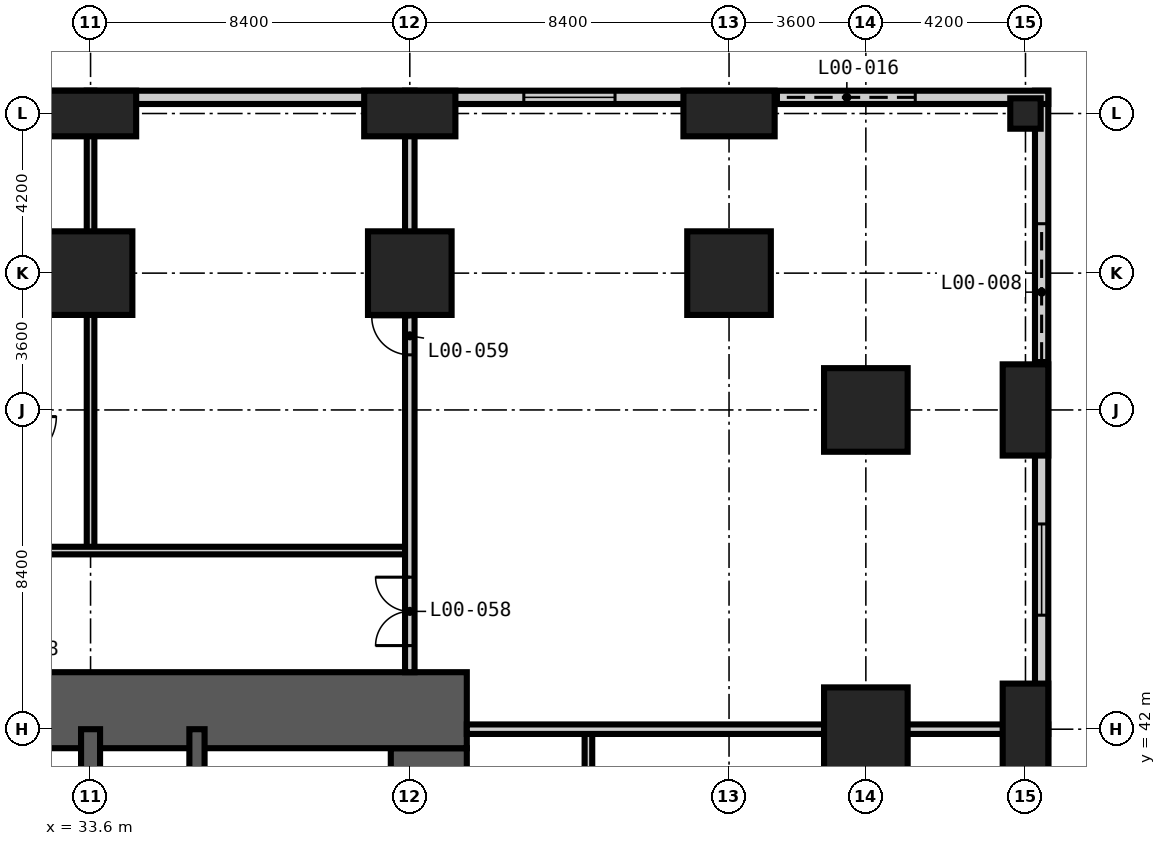
"""IFC4 building model, lengths in metres.
Left out: names, types, materials, properties, quantities, classifications, styles, units other than length and angle.
Written with IfcOpenShell. Run it as: python <this file> out.ifc"""

import sys

from ifc_helpers import new_model, si_unit, direction, frame, frame_2d, origin, origin_2d, place, context, subcontext, project, spatial, rectangle, extrude, element, fill, save


model = new_model("IFC4")
c1 = context("Model", 3, precision=1e-05, world=origin(), true_north=direction((0.0, 1.0)))
c2 = subcontext(c1, "Body", "Model", "MODEL_VIEW")
j1 = project(units=[si_unit("LENGTHUNIT", "METRE"), si_unit("PLANEANGLEUNIT", "RADIAN")], contexts=[c1])
p1 = place(None, origin())
s1 = spatial("IfcSite", under=j1, at=p1, CompositionType="ELEMENT")
p2 = place(p1, origin())
s2 = spatial("IfcBuilding", under=s1, at=p2, CompositionType="ELEMENT")
p3 = place(p2, origin())
s3 = spatial("IfcBuildingStorey", under=s2, at=p3, CompositionType="ELEMENT", Elevation=0.0)
p4 = place(p3, frame((33.6, 54.0, -0.3), z_axis=(0.0, 0.0, 1.0), x_axis=(1.0, 0.0, 0.0)))
e1 = element("IfcColumn", 1, at=p4, inside=s3, PredefinedType="COLUMN", context=c2, shape_type="SweptSolid", body=[
    extrude(rectangle(XDim=2.2, YDim=2.2, at=origin_2d()), origin(), (0.0, 0.0, 1.0), 6.0),
])
p5 = place(p3, frame((33.6, 58.2, -0.3), z_axis=(0.0, 0.0, 1.0), x_axis=(1.0, 0.0, 0.0)))
e2 = element("IfcColumn", 2, at=p5, inside=s3, PredefinedType="COLUMN", context=c2, shape_type="SweptSolid", body=[
    extrude(rectangle(XDim=2.4, YDim=1.2, at=origin_2d()), origin(), (0.0, 0.0, 1.0), 6.0),
])
p6 = place(p3, frame((42.0, 54.0, -0.3), z_axis=(0.0, 0.0, 1.0), x_axis=(1.0, 0.0, 0.0)))
e3 = element("IfcColumn", 3, at=p6, inside=s3, PredefinedType="COLUMN", context=c2, shape_type="SweptSolid", body=[
    extrude(rectangle(XDim=2.2, YDim=2.2, at=origin_2d()), origin(), (0.0, 0.0, 1.0), 6.0),
])
p7 = place(p3, frame((42.0, 58.2, -0.3), z_axis=(0.0, 0.0, 1.0), x_axis=(1.0, 0.0, 0.0)))
e4 = element("IfcColumn", 4, at=p7, inside=s3, PredefinedType="COLUMN", context=c2, shape_type="SweptSolid", body=[
    extrude(rectangle(XDim=2.4, YDim=1.2, at=origin_2d()), origin(), (0.0, 0.0, 1.0), 6.0),
])
p8 = place(p3, frame((50.4, 54.0, -0.3), z_axis=(0.0, 0.0, 1.0), x_axis=(1.0, 0.0, 0.0)))
e5 = element("IfcColumn", 5, at=p8, inside=s3, PredefinedType="COLUMN", context=c2, shape_type="SweptSolid", body=[
    extrude(rectangle(XDim=2.2, YDim=2.2, at=origin_2d()), origin(), (0.0, 0.0, 1.0), 6.0),
])
p9 = place(p3, frame((50.4, 58.2, -0.3), z_axis=(0.0, 0.0, 1.0), x_axis=(1.0, 0.0, 0.0)))
e6 = element("IfcColumn", 6, at=p9, inside=s3, PredefinedType="COLUMN", context=c2, shape_type="SweptSolid", body=[
    extrude(rectangle(XDim=2.4, YDim=1.2, at=origin_2d()), origin(), (0.0, 0.0, 1.0), 6.0),
])
for number, where, z_axis, x_axis in (
    (7, (54.0, 42.0, -0.3), (0.0, 0.0, 1.0), (1.0, 0.0, 0.0)),
    (8, (54.0, 50.4, -0.3), (0.0, 0.0, 1.0), (1.0, 0.0, 0.0)),
):
    element("IfcColumn", number, at=place(p3, frame(where, z_axis=z_axis, x_axis=x_axis)), inside=s3, PredefinedType="COLUMN", context=c2, shape_type="SweptSolid", body=[
        extrude(rectangle(XDim=2.2, YDim=2.2, at=origin_2d()), origin(), (0.0, 0.0, 1.0), 6.0),
    ])
for number, where, z_axis, x_axis in (
    (9, (58.2, 42.0, -0.3), (0.0, 0.0, 1.0), (1.0, 0.0, 0.0)),
    (10, (58.2, 50.4, -0.3), (0.0, 0.0, 1.0), (1.0, 0.0, 0.0)),
):
    element("IfcColumn", number, at=place(p3, frame(where, z_axis=z_axis, x_axis=x_axis)), inside=s3, PredefinedType="COLUMN", context=c2, shape_type="SweptSolid", body=[
        extrude(rectangle(XDim=1.2, YDim=2.4, at=origin_2d()), origin(), (0.0, 0.0, 1.0), 6.0),
    ])
p10 = place(p3, frame((58.2, 58.2, -0.3), z_axis=(0.0, 0.0, 1.0), x_axis=(1.0, 0.0, 0.0)))
e11 = element("IfcColumn", 11, at=p10, inside=s3, PredefinedType="COLUMN", context=c2, shape_type="SweptSolid", body=[
    extrude(rectangle(XDim=0.8, YDim=0.8, at=origin_2d()), origin(), (0.0, 0.0, 1.0), 6.0),
])
p11 = place(p3, frame((42.5, 17.3, -0.3), z_axis=(0.0, 0.0, 1.0), x_axis=(0.0, 1.0, 0.0)))
e12 = element("IfcWall", 12, at=p11, inside=s3, PredefinedType="SHEAR", context=c2, shape_type="SweptSolid", body=[
    extrude(rectangle(XDim=24.2, YDim=2.0, at=frame_2d((12.1, 0.0))), origin(), (0.0, 0.0, 1.0), 6.0),
])
p12 = place(p11, frame((0.3, 0.0, 0.3)))
e13 = element("IfcOpeningElement", 13, at=p12, cuts=e12, PredefinedType="OPENING", context=c2, shape_type="SweptSolid", body=[
    extrude(rectangle(XDim=1.2, YDim=2.2, at=frame_2d((0.6, 1.1))), frame((0.0, 1.01, 0.0), z_axis=(0.0, -1.0, 0.0), x_axis=(1.0, 0.0, 0.0)), (0.0, 0.0, 1.0), 2.02),
])
p13 = place(p11, frame((11.2, 0.0, 0.3)))
e14 = element("IfcOpeningElement", 14, at=p13, cuts=e12, PredefinedType="OPENING", context=c2, shape_type="SweptSolid", body=[
    extrude(rectangle(XDim=1.8, YDim=2.2, at=frame_2d((0.9, 1.1))), frame((0.0, 1.01, 0.0), z_axis=(0.0, -1.0, 0.0), x_axis=(1.0, 0.0, 0.0)), (0.0, 0.0, 1.0), 2.02),
])
p14 = place(p11, frame((20.0, 0.0, 0.3)))
e15 = element("IfcOpeningElement", 15, at=p14, cuts=e12, PredefinedType="OPENING", context=c2, shape_type="SweptSolid", body=[
    extrude(rectangle(XDim=1.0, YDim=2.1, at=frame_2d((0.5, 1.05))), frame((0.0, 1.01, 0.0), z_axis=(0.0, -1.0, 0.0), x_axis=(1.0, 0.0, 0.0)), (0.0, 0.0, 1.0), 2.02),
])
p15 = place(p3, frame((43.5, 42.5, -0.3), z_axis=(0.0, 0.0, 1.0), x_axis=(-1.0, 0.0, 0.0)))
e16 = element("IfcWall", 16, at=p15, inside=s3, PredefinedType="SHEAR", context=c2, shape_type="SweptSolid", body=[
    extrude(rectangle(XDim=28.2, YDim=2.0, at=frame_2d((14.1, 0.0))), origin(), (0.0, 0.0, 1.0), 6.0),
])
p16 = place(p15, frame((22.0, 0.0, 0.3)))
e17 = element("IfcOpeningElement", 17, at=p16, cuts=e16, PredefinedType="OPENING", context=c2, shape_type="SweptSolid", body=[
    extrude(rectangle(XDim=1.0, YDim=2.1, at=frame_2d((0.5, 1.05))), frame((0.0, 1.01, 0.0), z_axis=(0.0, -1.0, 0.0), x_axis=(1.0, 0.0, 0.0)), (0.0, 0.0, 1.0), 2.02),
])
p17 = place(p15, frame((11.4, 0.0, 0.3)))
e18 = element("IfcOpeningElement", 18, at=p17, cuts=e16, PredefinedType="OPENING", context=c2, shape_type="SweptSolid", body=[
    extrude(rectangle(XDim=1.2, YDim=2.2, at=frame_2d((0.6, 1.1))), frame((0.0, 1.01, 0.0), z_axis=(0.0, -1.0, 0.0), x_axis=(1.0, 0.0, 0.0)), (0.0, 0.0, 1.0), 2.02),
])
p18 = place(p3, frame((58.625, -8.4, 0.0), z_axis=(0.0, 0.0, 1.0), x_axis=(0.0, 1.0, 0.0)))
e19 = element("IfcWall", 19, at=p18, inside=s3, PredefinedType="SOLIDWALL", context=c2, shape_type="SweptSolid", body=[
    extrude(rectangle(XDim=67.2, YDim=0.35, at=frame_2d((33.6, 0.0))), origin(), (0.0, 0.0, 1.0), 5.7),
])
p19 = place(p18, frame((3.0, 0.0, 0.9)))
e20 = element("IfcOpeningElement", 20, at=p19, cuts=e19, PredefinedType="OPENING", context=c2, shape_type="SweptSolid", body=[
    extrude(rectangle(XDim=2.4, YDim=2.4, at=frame_2d((1.2, 1.2))), frame((0.0, 0.185, 0.0), z_axis=(0.0, -1.0, 0.0), x_axis=(1.0, 0.0, 0.0)), (0.0, 0.0, 1.0), 0.37),
])
p20 = place(p18, frame((18.1, 0.0, 0.0)))
e21 = element("IfcOpeningElement", 21, at=p20, cuts=e19, PredefinedType="OPENING", context=c2, shape_type="SweptSolid", body=[
    extrude(rectangle(XDim=2.4, YDim=3.0, at=frame_2d((1.2, 1.5))), frame((0.0, 0.185, 0.0), z_axis=(0.0, -1.0, 0.0), x_axis=(1.0, 0.0, 0.0)), (0.0, 0.0, 1.0), 0.37),
])
p21 = place(p18, frame((11.4, 0.0, 0.9)))
e22 = element("IfcOpeningElement", 22, at=p21, cuts=e19, PredefinedType="OPENING", context=c2, shape_type="SweptSolid", body=[
    extrude(rectangle(XDim=2.4, YDim=2.4, at=frame_2d((1.2, 1.2))), frame((0.0, 0.185, 0.0), z_axis=(0.0, -1.0, 0.0), x_axis=(1.0, 0.0, 0.0)), (0.0, 0.0, 1.0), 0.37),
])
p22 = place(p18, frame((20.7, 0.0, 0.9)))
e23 = element("IfcOpeningElement", 23, at=p22, cuts=e19, PredefinedType="OPENING", context=c2, shape_type="SweptSolid", body=[
    extrude(rectangle(XDim=2.4, YDim=2.4, at=frame_2d((1.2, 1.2))), frame((0.0, 0.185, 0.0), z_axis=(0.0, -1.0, 0.0), x_axis=(1.0, 0.0, 0.0)), (0.0, 0.0, 1.0), 0.37),
])
p23 = place(p18, frame((28.2, 0.0, 0.9)))
e24 = element("IfcOpeningElement", 24, at=p23, cuts=e19, PredefinedType="OPENING", context=c2, shape_type="SweptSolid", body=[
    extrude(rectangle(XDim=2.4, YDim=2.4, at=frame_2d((1.2, 1.2))), frame((0.0, 0.185, 0.0), z_axis=(0.0, -1.0, 0.0), x_axis=(1.0, 0.0, 0.0)), (0.0, 0.0, 1.0), 0.37),
])
p24 = place(p18, frame((36.6, 0.0, 0.9)))
e25 = element("IfcOpeningElement", 25, at=p24, cuts=e19, PredefinedType="OPENING", context=c2, shape_type="SweptSolid", body=[
    extrude(rectangle(XDim=2.4, YDim=2.4, at=frame_2d((1.2, 1.2))), frame((0.0, 0.185, 0.0), z_axis=(0.0, -1.0, 0.0), x_axis=(1.0, 0.0, 0.0)), (0.0, 0.0, 1.0), 0.37),
])
p25 = place(p18, frame((45.0, 0.0, 0.9)))
e26 = element("IfcOpeningElement", 26, at=p25, cuts=e19, PredefinedType="OPENING", context=c2, shape_type="SweptSolid", body=[
    extrude(rectangle(XDim=2.4, YDim=2.4, at=frame_2d((1.2, 1.2))), frame((0.0, 0.185, 0.0), z_axis=(0.0, -1.0, 0.0), x_axis=(1.0, 0.0, 0.0)), (0.0, 0.0, 1.0), 0.37),
])
p26 = place(p18, frame((60.1, 0.0, 0.0)))
e27 = element("IfcOpeningElement", 27, at=p26, cuts=e19, PredefinedType="OPENING", context=c2, shape_type="SweptSolid", body=[
    extrude(rectangle(XDim=3.6, YDim=4.5, at=frame_2d((1.8, 2.25))), frame((0.0, 0.185, 0.0), z_axis=(0.0, -1.0, 0.0), x_axis=(1.0, 0.0, 0.0)), (0.0, 0.0, 1.0), 0.37),
])
p27 = place(p18, frame((53.4, 0.0, 0.9)))
e28 = element("IfcOpeningElement", 28, at=p27, cuts=e19, PredefinedType="OPENING", context=c2, shape_type="SweptSolid", body=[
    extrude(rectangle(XDim=2.4, YDim=2.4, at=frame_2d((1.2, 1.2))), frame((0.0, 0.185, 0.0), z_axis=(0.0, -1.0, 0.0), x_axis=(1.0, 0.0, 0.0)), (0.0, 0.0, 1.0), 0.37),
])
p28 = place(p3, frame((58.8, 58.625, 0.0), z_axis=(0.0, 0.0, 1.0), x_axis=(-1.0, 0.0, 0.0)))
e29 = element("IfcWall", 29, at=p28, inside=s3, PredefinedType="SOLIDWALL", context=c2, shape_type="SweptSolid", body=[
    extrude(rectangle(XDim=92.4, YDim=0.35, at=frame_2d((46.2, 0.0))), origin(), (0.0, 0.0, 1.0), 5.7),
])
p29 = place(p28, frame((85.2, 0.0, 0.0)))
e30 = element("IfcOpeningElement", 30, at=p29, cuts=e29, PredefinedType="OPENING", context=c2, shape_type="SweptSolid", body=[
    extrude(rectangle(XDim=1.8, YDim=2.7, at=frame_2d((0.9, 1.35))), frame((0.0, 0.185, 0.0), z_axis=(0.0, -1.0, 0.0), x_axis=(1.0, 0.0, 0.0)), (0.0, 0.0, 1.0), 0.37),
])
p30 = place(p28, frame((87.2, 0.0, 0.9)))
e31 = element("IfcOpeningElement", 31, at=p30, cuts=e29, PredefinedType="OPENING", context=c2, shape_type="SweptSolid", body=[
    extrude(rectangle(XDim=2.4, YDim=2.4, at=frame_2d((1.2, 1.2))), frame((0.0, 0.185, 0.0), z_axis=(0.0, -1.0, 0.0), x_axis=(1.0, 0.0, 0.0)), (0.0, 0.0, 1.0), 0.37),
])
p31 = place(p28, frame((80.7, 0.0, 0.9)))
e32 = element("IfcOpeningElement", 32, at=p31, cuts=e29, PredefinedType="OPENING", context=c2, shape_type="SweptSolid", body=[
    extrude(rectangle(XDim=2.4, YDim=2.4, at=frame_2d((1.2, 1.2))), frame((0.0, 0.185, 0.0), z_axis=(0.0, -1.0, 0.0), x_axis=(1.0, 0.0, 0.0)), (0.0, 0.0, 1.0), 0.37),
])
p32 = place(p28, frame((76.2, 0.0, 0.9)))
e33 = element("IfcOpeningElement", 33, at=p32, cuts=e29, PredefinedType="OPENING", context=c2, shape_type="SweptSolid", body=[
    extrude(rectangle(XDim=2.4, YDim=2.4, at=frame_2d((1.2, 1.2))), frame((0.0, 0.185, 0.0), z_axis=(0.0, -1.0, 0.0), x_axis=(1.0, 0.0, 0.0)), (0.0, 0.0, 1.0), 0.37),
])
p33 = place(p28, frame((71.9, 0.0, 0.0)))
e34 = element("IfcOpeningElement", 34, at=p33, cuts=e29, PredefinedType="OPENING", context=c2, shape_type="SweptSolid", body=[
    extrude(rectangle(XDim=1.2, YDim=2.4, at=frame_2d((0.6, 1.2))), frame((0.0, 0.185, 0.0), z_axis=(0.0, -1.0, 0.0), x_axis=(1.0, 0.0, 0.0)), (0.0, 0.0, 1.0), 0.37),
])
p34 = place(p28, frame((63.5, 0.0, 0.0)))
e35 = element("IfcOpeningElement", 35, at=p34, cuts=e29, PredefinedType="OPENING", context=c2, shape_type="SweptSolid", body=[
    extrude(rectangle(XDim=1.2, YDim=2.4, at=frame_2d((0.6, 1.2))), frame((0.0, 0.185, 0.0), z_axis=(0.0, -1.0, 0.0), x_axis=(1.0, 0.0, 0.0)), (0.0, 0.0, 1.0), 0.37),
])
p35 = place(p28, frame((59.0, 0.0, 0.0)))
e36 = element("IfcOpeningElement", 36, at=p35, cuts=e29, PredefinedType="OPENING", context=c2, shape_type="SweptSolid", body=[
    extrude(rectangle(XDim=2.4, YDim=3.0, at=frame_2d((1.2, 1.5))), frame((0.0, 0.185, 0.0), z_axis=(0.0, -1.0, 0.0), x_axis=(1.0, 0.0, 0.0)), (0.0, 0.0, 1.0), 0.37),
])
p36 = place(p28, frame((53.4, 0.0, 0.9)))
e37 = element("IfcOpeningElement", 37, at=p36, cuts=e29, PredefinedType="OPENING", context=c2, shape_type="SweptSolid", body=[
    extrude(rectangle(XDim=2.4, YDim=2.4, at=frame_2d((1.2, 1.2))), frame((0.0, 0.185, 0.0), z_axis=(0.0, -1.0, 0.0), x_axis=(1.0, 0.0, 0.0)), (0.0, 0.0, 1.0), 0.37),
])
p37 = place(p28, frame((43.25, 0.0, 0.0)))
e38 = element("IfcOpeningElement", 38, at=p37, cuts=e29, PredefinedType="OPENING", context=c2, shape_type="SweptSolid", body=[
    extrude(rectangle(XDim=2.4, YDim=3.0, at=frame_2d((1.2, 1.5))), frame((0.0, 0.185, 0.0), z_axis=(0.0, -1.0, 0.0), x_axis=(1.0, 0.0, 0.0)), (0.0, 0.0, 1.0), 0.37),
])
p38 = place(p28, frame((37.7, 0.0, 0.0)))
e39 = element("IfcOpeningElement", 39, at=p38, cuts=e29, PredefinedType="OPENING", context=c2, shape_type="SweptSolid", body=[
    extrude(rectangle(XDim=1.2, YDim=2.4, at=frame_2d((0.6, 1.2))), frame((0.0, 0.185, 0.0), z_axis=(0.0, -1.0, 0.0), x_axis=(1.0, 0.0, 0.0)), (0.0, 0.0, 1.0), 0.37),
])
p39 = place(p28, frame((29.2, 0.0, 0.0)))
e40 = element("IfcOpeningElement", 40, at=p39, cuts=e29, PredefinedType="OPENING", context=c2, shape_type="SweptSolid", body=[
    extrude(rectangle(XDim=1.2, YDim=2.4, at=frame_2d((0.6, 1.2))), frame((0.0, 0.185, 0.0), z_axis=(0.0, -1.0, 0.0), x_axis=(1.0, 0.0, 0.0)), (0.0, 0.0, 1.0), 0.37),
])
p40 = place(p28, frame((3.5, 0.0, 0.0)))
e41 = element("IfcOpeningElement", 41, at=p40, cuts=e29, PredefinedType="OPENING", context=c2, shape_type="SweptSolid", body=[
    extrude(rectangle(XDim=3.6, YDim=4.5, at=frame_2d((1.8, 2.25))), frame((0.0, 0.185, 0.0), z_axis=(0.0, -1.0, 0.0), x_axis=(1.0, 0.0, 0.0)), (0.0, 0.0, 1.0), 0.37),
])
p41 = place(p28, frame((11.4, 0.0, 0.9)))
e42 = element("IfcOpeningElement", 42, at=p41, cuts=e29, PredefinedType="OPENING", context=c2, shape_type="SweptSolid", body=[
    extrude(rectangle(XDim=2.4, YDim=2.4, at=frame_2d((1.2, 1.2))), frame((0.0, 0.185, 0.0), z_axis=(0.0, -1.0, 0.0), x_axis=(1.0, 0.0, 0.0)), (0.0, 0.0, 1.0), 0.37),
])
p42 = place(p3, frame((36.4, 33.6, -0.3), z_axis=(0.0, 0.0, 1.0), x_axis=(0.0, 1.0, 0.0)))
e43 = element("IfcWall", 43, at=p42, inside=s3, PredefinedType="SHEAR", context=c2, shape_type="SweptSolid", body=[
    extrude(rectangle(XDim=8.4, YDim=0.4, at=frame_2d((4.2, 0.0))), origin(), (0.0, 0.0, 1.0), 6.0),
])
p43 = place(p3, frame((33.6, 16.8, -0.3), z_axis=(0.0, 0.0, 1.0), x_axis=(0.0, 1.0, 0.0)))
e44 = element("IfcWall", 44, at=p43, inside=s3, PredefinedType="SHEAR", context=c2, shape_type="SweptSolid", body=[
    extrude(rectangle(XDim=25.2, YDim=0.5, at=frame_2d((12.6, 0.0))), origin(), (0.0, 0.0, 1.0), 6.0),
])
p44 = place(p43, frame((22.5, 0.0, 0.3)))
e45 = element("IfcOpeningElement", 45, at=p44, cuts=e44, PredefinedType="OPENING", context=c2, shape_type="SweptSolid", body=[
    extrude(rectangle(XDim=1.2, YDim=2.2, at=frame_2d((0.6, 1.1))), frame((0.0, 0.26, 0.0), z_axis=(0.0, -1.0, 0.0), x_axis=(1.0, 0.0, 0.0)), (0.0, 0.0, 1.0), 0.52),
])
p45 = place(p43, frame((18.3, 0.0, 0.3)))
e46 = element("IfcOpeningElement", 46, at=p45, cuts=e44, PredefinedType="OPENING", context=c2, shape_type="SweptSolid", body=[
    extrude(rectangle(XDim=1.2, YDim=2.2, at=frame_2d((0.6, 1.1))), frame((0.0, 0.26, 0.0), z_axis=(0.0, -1.0, 0.0), x_axis=(1.0, 0.0, 0.0)), (0.0, 0.0, 1.0), 0.52),
])
p46 = place(p3, frame((33.6, 46.7, 0.0), z_axis=(0.0, 0.0, 1.0), x_axis=(0.0, 1.0, 0.0)))
e47 = element("IfcWall", 47, at=p46, inside=s3, PredefinedType="PARTITIONING", context=c2, shape_type="SweptSolid", body=[
    extrude(rectangle(XDim=12.1, YDim=0.2, at=frame_2d((6.05, 0.0))), origin(), (0.0, 0.0, 1.0), 5.7),
])
p47 = place(p3, frame((46.7, 33.6, 0.0), z_axis=(0.0, 0.0, 1.0), x_axis=(0.0, 1.0, 0.0)))
e48 = element("IfcWall", 48, at=p47, inside=s3, PredefinedType="PARTITIONING", context=c2, shape_type="SweptSolid", body=[
    extrude(rectangle(XDim=8.4, YDim=0.2, at=frame_2d((4.2, 0.0))), origin(), (0.0, 0.0, 1.0), 5.7),
])
p48 = place(p47, frame((3.3, 0.0, 0.0)))
e49 = element("IfcOpeningElement", 49, at=p48, cuts=e48, PredefinedType="OPENING", context=c2, shape_type="SweptSolid", body=[
    extrude(rectangle(XDim=1.8, YDim=2.4, at=frame_2d((0.9, 1.2))), frame((0.0, 0.11, 0.0), z_axis=(0.0, -1.0, 0.0), x_axis=(1.0, 0.0, 0.0)), (0.0, 0.0, 1.0), 0.22),
])
p49 = place(p3, frame((29.4, 46.7, 0.0), z_axis=(0.0, 0.0, 1.0), x_axis=(1.0, 0.0, 0.0)))
e50 = element("IfcWall", 50, at=p49, inside=s3, PredefinedType="PARTITIONING", context=c2, shape_type="SweptSolid", body=[
    extrude(rectangle(XDim=12.6, YDim=0.2, at=frame_2d((6.3, 0.0))), origin(), (0.0, 0.0, 1.0), 5.7),
])
p50 = place(p49, frame((1.6, 0.0, 0.0)))
e51 = element("IfcOpeningElement", 51, at=p50, cuts=e50, PredefinedType="OPENING", context=c2, shape_type="SweptSolid", body=[
    extrude(rectangle(XDim=1.0, YDim=2.1, at=frame_2d((0.5, 1.05))), frame((0.0, 0.11, 0.0), z_axis=(0.0, -1.0, 0.0), x_axis=(1.0, 0.0, 0.0)), (0.0, 0.0, 1.0), 0.22),
])
p51 = place(p3, frame((42.0, 43.5, 0.0), z_axis=(0.0, 0.0, 1.0), x_axis=(0.0, 1.0, 0.0)))
e52 = element("IfcWall", 52, at=p51, inside=s3, PredefinedType="PARTITIONING", context=c2, shape_type="SweptSolid", body=[
    extrude(rectangle(XDim=15.3, YDim=0.25, at=frame_2d((7.65, 0.0))), origin(), (0.0, 0.0, 1.0), 5.7),
])
p52 = place(p51, frame((0.7, 0.0, 0.0)))
e53 = element("IfcOpeningElement", 53, at=p52, cuts=e52, PredefinedType="OPENING", context=c2, shape_type="SweptSolid", body=[
    extrude(rectangle(XDim=1.8, YDim=2.4, at=frame_2d((0.9, 1.2))), frame((0.0, 0.135, 0.0), z_axis=(0.0, -1.0, 0.0), x_axis=(1.0, 0.0, 0.0)), (0.0, 0.0, 1.0), 0.27),
])
p53 = place(p51, frame((8.35, 0.0, 0.0)))
e54 = element("IfcOpeningElement", 54, at=p53, cuts=e52, PredefinedType="OPENING", context=c2, shape_type="SweptSolid", body=[
    extrude(rectangle(XDim=1.0, YDim=2.1, at=frame_2d((0.5, 1.05))), frame((0.0, 0.135, 0.0), z_axis=(0.0, -1.0, 0.0), x_axis=(1.0, 0.0, 0.0)), (0.0, 0.0, 1.0), 0.27),
])
p54 = place(p3, frame((43.5, 42.0, 0.0), z_axis=(0.0, 0.0, 1.0), x_axis=(1.0, 0.0, 0.0)))
e55 = element("IfcWall", 55, at=p54, inside=s3, PredefinedType="PARTITIONING", context=c2, shape_type="SweptSolid", body=[
    extrude(rectangle(XDim=15.3, YDim=0.25, at=frame_2d((7.65, 0.0))), origin(), (0.0, 0.0, 1.0), 5.7),
])
p55 = place(p26, origin())
e56 = element("IfcDoor", 56, at=p55, inside=s3, OperationType="ROLLINGUP", PredefinedType="DOOR", context=c2, shape_type="SweptSolid", body=[
    extrude(rectangle(XDim=3.6, YDim=4.5, at=frame_2d((1.8, 2.25))), frame((0.0, 0.025, 0.0), z_axis=(0.0, -1.0, 0.0), x_axis=(1.0, 0.0, 0.0)), (0.0, 0.0, 1.0), 0.05),
])
fill(e27, e56)
p56 = place(p27, origin())
e57 = element("IfcWindow", 57, at=p56, inside=s3, PartitioningType="SINGLE_PANEL", PredefinedType="WINDOW", context=c2, shape_type="SweptSolid", body=[
    extrude(rectangle(XDim=2.4, YDim=2.4, at=frame_2d((1.2, 1.2))), frame((0.0, 0.03, 0.0), z_axis=(0.0, -1.0, 0.0), x_axis=(1.0, 0.0, 0.0)), (0.0, 0.0, 1.0), 0.06),
])
fill(e28, e57)
p57 = place(p40, origin())
e58 = element("IfcDoor", 58, at=p57, inside=s3, OperationType="ROLLINGUP", PredefinedType="DOOR", context=c2, shape_type="SweptSolid", body=[
    extrude(rectangle(XDim=3.6, YDim=4.5, at=frame_2d((1.8, 2.25))), frame((0.0, 0.025, 0.0), z_axis=(0.0, -1.0, 0.0), x_axis=(1.0, 0.0, 0.0)), (0.0, 0.0, 1.0), 0.05),
])
fill(e41, e58)
p58 = place(p41, origin())
e59 = element("IfcWindow", 59, at=p58, inside=s3, PartitioningType="SINGLE_PANEL", PredefinedType="WINDOW", context=c2, shape_type="SweptSolid", body=[
    extrude(rectangle(XDim=2.4, YDim=2.4, at=frame_2d((1.2, 1.2))), frame((0.0, 0.03, 0.0), z_axis=(0.0, -1.0, 0.0), x_axis=(1.0, 0.0, 0.0)), (0.0, 0.0, 1.0), 0.06),
])
fill(e42, e59)
p59 = place(p52, origin())
e60 = element("IfcDoor", 60, at=p59, inside=s3, OperationType="DOUBLE_DOOR_DOUBLE_SWING", PredefinedType="DOOR", context=c2, shape_type="SweptSolid", body=[
    extrude(rectangle(XDim=1.8, YDim=2.4, at=frame_2d((0.9, 1.2))), frame((0.0, 0.025, 0.0), z_axis=(0.0, -1.0, 0.0), x_axis=(1.0, 0.0, 0.0)), (0.0, 0.0, 1.0), 0.05),
])
fill(e53, e60)
p60 = place(p53, origin())
e61 = element("IfcDoor", 61, at=p60, inside=s3, OperationType="SINGLE_SWING_RIGHT", PredefinedType="DOOR", context=c2, shape_type="SweptSolid", body=[
    extrude(rectangle(XDim=1.0, YDim=2.1, at=frame_2d((0.5, 1.05))), frame((0.0, 0.025, 0.0), z_axis=(0.0, -1.0, 0.0), x_axis=(1.0, 0.0, 0.0)), (0.0, 0.0, 1.0), 0.05),
])
fill(e54, e61)
save(model, sys.argv[1])
